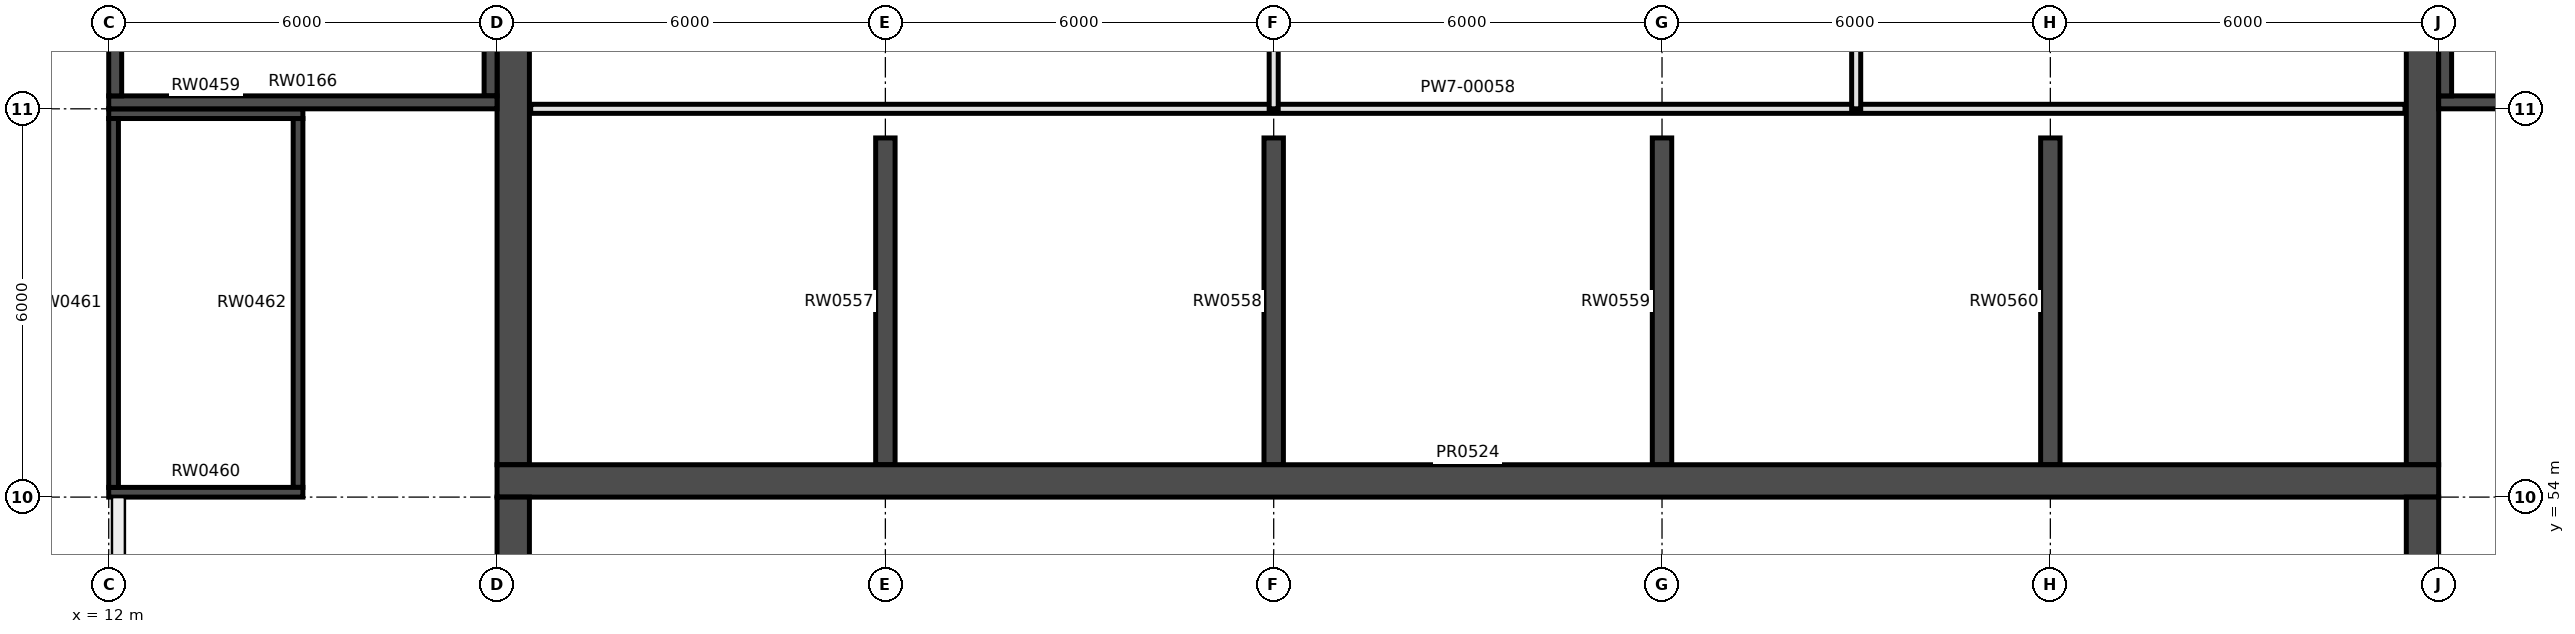
"""IFC4 building model, lengths in metres.
Left out: names, types, materials, properties, quantities, classifications, styles, units other than length and angle.
Written with IfcOpenShell. Run it as: python <this file> out.ifc"""

import sys

from ifc_helpers import new_model, si_unit, direction, frame, frame_2d, origin, place, context, subcontext, project, spatial, rectangle, extrude, element, fill, save


model = new_model("IFC4")
c1 = context("Model", 3, precision=1e-05, world=origin(), true_north=direction((0.0, 1.0)))
c2 = subcontext(c1, "Body", "Model", "MODEL_VIEW")
j1 = project(units=[si_unit("LENGTHUNIT", "METRE"), si_unit("PLANEANGLEUNIT", "RADIAN")], contexts=[c1])
p1 = place(None, origin())
s1 = spatial("IfcSite", under=j1, at=p1, CompositionType="ELEMENT")
p2 = place(p1, origin())
s2 = spatial("IfcBuilding", under=s1, at=p2, CompositionType="ELEMENT")
p3 = place(p2, origin())
s3 = spatial("IfcBuildingStorey", under=s2, at=p3, CompositionType="ELEMENT", Elevation=0.0)
p4 = place(p3, frame((12.0, 60.1, -0.3), z_axis=(0.0, 0.0, 1.0), x_axis=(1.0, 0.0, 0.0)))
e1 = element("IfcWall", 1, at=p4, inside=s3, PredefinedType="SHEAR", context=c2, shape_type="SweptSolid", body=[
    extrude(rectangle(XDim=6.0, YDim=0.2, at=frame_2d((3.0, 0.0))), origin(), (0.0, 0.0, 1.0), 7.3),
])
p5 = place(p4, frame((3.375, 0.0, 0.3)))
e2 = element("IfcOpeningElement", 2, at=p5, cuts=e1, PredefinedType="OPENING", context=c2, shape_type="SweptSolid", body=[
    extrude(rectangle(XDim=1.8, YDim=2.2, at=frame_2d((0.9, 1.1))), frame((0.0, 0.11, 0.0), z_axis=(0.0, -1.0, 0.0), x_axis=(1.0, 0.0, 0.0)), (0.0, 0.0, 1.0), 0.22),
])
p6 = place(p3, frame((12.1, 60.2, -0.3), z_axis=(0.0, 0.0, 1.0), x_axis=(0.0, 1.0, 0.0)))
e3 = element("IfcWall", 3, at=p6, inside=s3, PredefinedType="SHEAR", context=c2, shape_type="SweptSolid", body=[
    extrude(rectangle(XDim=5.6, YDim=0.2, at=frame_2d((2.8, 0.0))), origin(), (0.0, 0.0, 1.0), 7.3),
])
p7 = place(p6, frame((0.1, 0.0, 0.3)))
e4 = element("IfcOpeningElement", 4, at=p7, cuts=e3, PredefinedType="OPENING", context=c2, shape_type="SweptSolid", body=[
    extrude(rectangle(XDim=1.1, YDim=2.4, at=frame_2d((0.55, 1.2))), frame((0.0, 0.11, 0.0), z_axis=(0.0, -1.0, 0.0), x_axis=(1.0, 0.0, 0.0)), (0.0, 0.0, 1.0), 0.22),
])
p8 = place(p3, frame((17.9, 60.2, -0.3), z_axis=(0.0, 0.0, 1.0), x_axis=(0.0, 1.0, 0.0)))
e5 = element("IfcWall", 5, at=p8, inside=s3, PredefinedType="SHEAR", context=c2, shape_type="SweptSolid", body=[
    extrude(rectangle(XDim=5.6, YDim=0.2, at=frame_2d((2.8, 0.0))), origin(), (0.0, 0.0, 1.0), 7.3),
])
p9 = place(p3, frame((48.0, 60.1, -0.3), z_axis=(0.0, 0.0, 1.0), x_axis=(1.0, 0.0, 0.0)))
e6 = element("IfcWall", 6, at=p9, inside=s3, PredefinedType="SHEAR", context=c2, shape_type="SweptSolid", body=[
    extrude(rectangle(XDim=6.0, YDim=0.2, at=frame_2d((3.0, 0.0))), origin(), (0.0, 0.0, 1.0), 7.3),
])
p10 = place(p9, frame((0.825, 0.0, 0.3)))
e7 = element("IfcOpeningElement", 7, at=p10, cuts=e6, PredefinedType="OPENING", context=c2, shape_type="SweptSolid", body=[
    extrude(rectangle(XDim=1.8, YDim=2.2, at=frame_2d((0.9, 1.1))), frame((0.0, 0.11, 0.0), z_axis=(0.0, -1.0, 0.0), x_axis=(1.0, 0.0, 0.0)), (0.0, 0.0, 1.0), 0.22),
])
p11 = place(p3, frame((48.1, 60.2, -0.3), z_axis=(0.0, 0.0, 1.0), x_axis=(0.0, 1.0, 0.0)))
e8 = element("IfcWall", 8, at=p11, inside=s3, PredefinedType="SHEAR", context=c2, shape_type="SweptSolid", body=[
    extrude(rectangle(XDim=5.6, YDim=0.2, at=frame_2d((2.8, 0.0))), origin(), (0.0, 0.0, 1.0), 7.3),
])
for number, where, z_axis, x_axis in (
    (9, (12.0, 59.925, -0.3), (0.0, 0.0, 1.0), (1.0, 0.0, 0.0)),
    (10, (12.0, 54.075, -0.3), (0.0, 0.0, 1.0), (1.0, 0.0, 0.0)),
):
    element("IfcWall", number, at=place(p3, frame(where, z_axis=z_axis, x_axis=x_axis)), inside=s3, PredefinedType="SHEAR", context=c2, shape_type="SweptSolid", body=[
        extrude(rectangle(XDim=3.0, YDim=0.15, at=frame_2d((1.5, 0.0))), origin(), (0.0, 0.0, 1.0), 7.3),
    ])
p12 = place(p3, frame((12.075, 54.15, -0.3), z_axis=(0.0, 0.0, 1.0), x_axis=(0.0, 1.0, 0.0)))
e11 = element("IfcWall", 11, at=p12, inside=s3, PredefinedType="SHEAR", context=c2, shape_type="SweptSolid", body=[
    extrude(rectangle(XDim=5.7, YDim=0.15, at=frame_2d((2.85, 0.0))), origin(), (0.0, 0.0, 1.0), 7.3),
])
p13 = place(p3, frame((14.925, 54.15, -0.3), z_axis=(0.0, 0.0, 1.0), x_axis=(0.0, 1.0, 0.0)))
e12 = element("IfcWall", 12, at=p13, inside=s3, PredefinedType="SHEAR", context=c2, shape_type="SweptSolid", body=[
    extrude(rectangle(XDim=5.7, YDim=0.15, at=frame_2d((2.85, 0.0))), origin(), (0.0, 0.0, 1.0), 7.3),
])
p14 = place(p13, frame((2.5, 0.0, 0.3)))
e13 = element("IfcOpeningElement", 13, at=p14, cuts=e12, PredefinedType="OPENING", context=c2, shape_type="SweptSolid", body=[
    extrude(rectangle(XDim=0.6, YDim=2.04, at=frame_2d((0.3, 1.02))), frame((0.0, 0.085, 0.0), z_axis=(0.0, -1.0, 0.0), x_axis=(1.0, 0.0, 0.0)), (0.0, 0.0, 1.0), 0.17),
])
p15 = place(p3, frame((18.25, 54.5, -0.3), z_axis=(0.0, 0.0, 1.0), x_axis=(0.0, 1.0, 0.0)))
e14 = element("IfcWall", 14, at=p15, inside=s3, PredefinedType="SHEAR", context=c2, shape_type="SweptSolid", body=[
    extrude(rectangle(XDim=35.5, YDim=0.5, at=frame_2d((17.75, 0.0))), origin(), (0.0, 0.0, 1.0), 7.3),
])
p16 = place(p15, frame((1.55, 0.0, 0.3)))
e15 = element("IfcOpeningElement", 15, at=p16, cuts=e14, PredefinedType="OPENING", context=c2, shape_type="SweptSolid", body=[
    extrude(rectangle(XDim=1.8, YDim=2.1, at=frame_2d((0.9, 1.05))), frame((0.0, 0.26, 0.0), z_axis=(0.0, -1.0, 0.0), x_axis=(1.0, 0.0, 0.0)), (0.0, 0.0, 1.0), 0.52),
])
p17 = place(p15, frame((18.05, 0.0, 0.3)))
e16 = element("IfcOpeningElement", 16, at=p17, cuts=e14, PredefinedType="OPENING", context=c2, shape_type="SweptSolid", body=[
    extrude(rectangle(XDim=1.8, YDim=2.1, at=frame_2d((0.9, 1.05))), frame((0.0, 0.26, 0.0), z_axis=(0.0, -1.0, 0.0), x_axis=(1.0, 0.0, 0.0)), (0.0, 0.0, 1.0), 0.52),
])
p18 = place(p3, frame((18.25, 30.0, -0.3), z_axis=(0.0, 0.0, 1.0), x_axis=(0.0, 1.0, 0.0)))
e17 = element("IfcWall", 17, at=p18, inside=s3, PredefinedType="SHEAR", context=c2, shape_type="SweptSolid", body=[
    extrude(rectangle(XDim=24.0, YDim=0.5, at=frame_2d((12.0, 0.0))), origin(), (0.0, 0.0, 1.0), 7.3),
])
p19 = place(p18, frame((16.95, 0.0, 0.3)))
e18 = element("IfcOpeningElement", 18, at=p19, cuts=e17, PredefinedType="OPENING", context=c2, shape_type="SweptSolid", body=[
    extrude(rectangle(XDim=2.1, YDim=2.4, at=frame_2d((1.05, 1.2))), frame((0.0, 0.26, 0.0), z_axis=(0.0, -1.0, 0.0), x_axis=(1.0, 0.0, 0.0)), (0.0, 0.0, 1.0), 0.52),
])
p20 = place(p18, frame((2.25, 0.0, 0.3)))
e19 = element("IfcOpeningElement", 19, at=p20, cuts=e17, PredefinedType="OPENING", context=c2, shape_type="SweptSolid", body=[
    extrude(rectangle(XDim=1.5, YDim=2.1, at=frame_2d((0.75, 1.05))), frame((0.0, 0.26, 0.0), z_axis=(0.0, -1.0, 0.0), x_axis=(1.0, 0.0, 0.0)), (0.0, 0.0, 1.0), 0.52),
])
p21 = place(p3, frame((47.75, 54.5, -0.3), z_axis=(0.0, 0.0, 1.0), x_axis=(0.0, 1.0, 0.0)))
e20 = element("IfcWall", 20, at=p21, inside=s3, PredefinedType="SHEAR", context=c2, shape_type="SweptSolid", body=[
    extrude(rectangle(XDim=35.5, YDim=0.5, at=frame_2d((17.75, 0.0))), origin(), (0.0, 0.0, 1.0), 7.3),
])
p22 = place(p21, frame((18.05, 0.0, 0.3)))
e21 = element("IfcOpeningElement", 21, at=p22, cuts=e20, PredefinedType="OPENING", context=c2, shape_type="SweptSolid", body=[
    extrude(rectangle(XDim=1.8, YDim=2.1, at=frame_2d((0.9, 1.05))), frame((0.0, 0.26, 0.0), z_axis=(0.0, -1.0, 0.0), x_axis=(1.0, 0.0, 0.0)), (0.0, 0.0, 1.0), 0.52),
])
p23 = place(p21, frame((3.6, 0.0, 0.3)))
e22 = element("IfcOpeningElement", 22, at=p23, cuts=e20, PredefinedType="OPENING", context=c2, shape_type="SweptSolid", body=[
    extrude(rectangle(XDim=1.0, YDim=2.1, at=frame_2d((0.5, 1.05))), frame((0.0, 0.26, 0.0), z_axis=(0.0, -1.0, 0.0), x_axis=(1.0, 0.0, 0.0)), (0.0, 0.0, 1.0), 0.52),
])
p24 = place(p3, frame((47.75, 30.0, -0.3), z_axis=(0.0, 0.0, 1.0), x_axis=(0.0, 1.0, 0.0)))
e23 = element("IfcWall", 23, at=p24, inside=s3, PredefinedType="SHEAR", context=c2, shape_type="SweptSolid", body=[
    extrude(rectangle(XDim=24.0, YDim=0.5, at=frame_2d((12.0, 0.0))), origin(), (0.0, 0.0, 1.0), 7.3),
])
p25 = place(p24, frame((2.25, 0.0, 0.3)))
e24 = element("IfcOpeningElement", 24, at=p25, cuts=e23, PredefinedType="OPENING", context=c2, shape_type="SweptSolid", body=[
    extrude(rectangle(XDim=1.5, YDim=2.1, at=frame_2d((0.75, 1.05))), frame((0.0, 0.26, 0.0), z_axis=(0.0, -1.0, 0.0), x_axis=(1.0, 0.0, 0.0)), (0.0, 0.0, 1.0), 0.52),
])
p26 = place(p24, frame((22.3, 0.0, 0.3)))
e25 = element("IfcOpeningElement", 25, at=p26, cuts=e23, PredefinedType="OPENING", context=c2, shape_type="SweptSolid", body=[
    extrude(rectangle(XDim=1.0, YDim=2.1, at=frame_2d((0.5, 1.05))), frame((0.0, 0.26, 0.0), z_axis=(0.0, -1.0, 0.0), x_axis=(1.0, 0.0, 0.0)), (0.0, 0.0, 1.0), 0.52),
])
p27 = place(p3, frame((18.0, 54.25, -0.3), z_axis=(0.0, 0.0, 1.0), x_axis=(1.0, 0.0, 0.0)))
e26 = element("IfcWall", 26, at=p27, inside=s3, PredefinedType="SHEAR", context=c2, shape_type="SweptSolid", body=[
    extrude(rectangle(XDim=30.0, YDim=0.5, at=frame_2d((15.0, 0.0))), origin(), (0.0, 0.0, 1.0), 7.3),
])
for number, where, z_axis, x_axis in (
    (27, (24.0, 54.5, -0.3), (0.0, 0.0, 1.0), (0.0, 1.0, 0.0)),
    (28, (30.0, 54.5, -0.3), (0.0, 0.0, 1.0), (0.0, 1.0, 0.0)),
    (29, (36.0, 54.5, -0.3), (0.0, 0.0, 1.0), (0.0, 1.0, 0.0)),
    (30, (42.0, 54.5, -0.3), (0.0, 0.0, 1.0), (0.0, 1.0, 0.0)),
):
    element("IfcWall", number, at=place(p3, frame(where, z_axis=z_axis, x_axis=x_axis)), inside=s3, PredefinedType="SHEAR", context=c2, shape_type="SweptSolid", body=[
        extrude(rectangle(XDim=5.05, YDim=0.3, at=frame_2d((2.525, 0.0))), origin(), (0.0, 0.0, 1.0), 4.0),
    ])
p28 = place(p3, frame((18.52, 60.0, 0.0), z_axis=(0.0, 0.0, 1.0), x_axis=(1.0, 0.0, 0.0)))
e31 = element("IfcWall", 31, at=p28, inside=s3, PredefinedType="PARTITIONING", context=c2, shape_type="SweptSolid", body=[
    extrude(rectangle(XDim=28.96, YDim=0.14, at=frame_2d((14.48, 0.0))), origin(), (0.0, 0.0, 1.0), 2.964),
])
for number, where, z_axis, x_axis in (
    (32, (30.0, 60.0, 0.0), (0.0, 0.0, 1.0), (0.0, 1.0, 0.0)),
    (33, (39.0, 60.0, 0.0), (0.0, 0.0, 1.0), (0.0, 1.0, 0.0)),
):
    element("IfcWall", number, at=place(p3, frame(where, z_axis=z_axis, x_axis=x_axis)), inside=s3, PredefinedType="PARTITIONING", context=c2, shape_type="SweptSolid", body=[
        extrude(rectangle(XDim=12.0, YDim=0.14, at=frame_2d((6.0, 0.0))), origin(), (0.0, 0.0, 1.0), 2.964),
    ])
p29 = place(p7, origin())
e34 = element("IfcDoor", 34, at=p29, inside=s3, OperationType="DOUBLE_DOOR_SINGLE_SWING", PredefinedType="DOOR", context=c2, shape_type="SweptSolid", body=[
    extrude(rectangle(XDim=1.1, YDim=2.4, at=frame_2d((0.55, 1.2))), frame((0.0, 0.025, 0.0), z_axis=(0.0, -1.0, 0.0), x_axis=(1.0, 0.0, 0.0)), (0.0, 0.0, 1.0), 0.05),
])
fill(e4, e34)
p30 = place(p16, frame((1.8, 0.0, 0.0), z_axis=(0.0, 0.0, 1.0), x_axis=(-1.0, 0.0, 0.0)))
e35 = element("IfcDoor", 35, at=p30, inside=s3, OperationType="DOUBLE_DOOR_SINGLE_SWING", PredefinedType="DOOR", context=c2, shape_type="SweptSolid", body=[
    extrude(rectangle(XDim=1.8, YDim=2.1, at=frame_2d((0.9, 1.05))), frame((0.0, 0.025, 0.0), z_axis=(0.0, -1.0, 0.0), x_axis=(1.0, 0.0, 0.0)), (0.0, 0.0, 1.0), 0.05),
])
fill(e15, e35)
p31 = place(p5, origin())
e36 = element("IfcDoor", 36, at=p31, inside=s3, OperationType="DOUBLE_DOOR_SINGLE_SWING", PredefinedType="DOOR", context=c2, shape_type="SweptSolid", body=[
    extrude(rectangle(XDim=1.8, YDim=2.2, at=frame_2d((0.9, 1.1))), frame((0.0, 0.025, 0.0), z_axis=(0.0, -1.0, 0.0), x_axis=(1.0, 0.0, 0.0)), (0.0, 0.0, 1.0), 0.05),
])
fill(e2, e36)
p32 = place(p10, origin())
e37 = element("IfcDoor", 37, at=p32, inside=s3, OperationType="DOUBLE_DOOR_SINGLE_SWING", PredefinedType="DOOR", context=c2, shape_type="SweptSolid", body=[
    extrude(rectangle(XDim=1.8, YDim=2.2, at=frame_2d((0.9, 1.1))), frame((0.0, 0.025, 0.0), z_axis=(0.0, -1.0, 0.0), x_axis=(1.0, 0.0, 0.0)), (0.0, 0.0, 1.0), 0.05),
])
fill(e7, e37)
p33 = place(p14, origin())
e38 = element("IfcDoor", 38, at=p33, inside=s3, OperationType="SINGLE_SWING_RIGHT", PredefinedType="DOOR", context=c2, shape_type="SweptSolid", body=[
    extrude(rectangle(XDim=0.6, YDim=2.04, at=frame_2d((0.3, 1.02))), frame((0.0, 0.025, 0.0), z_axis=(0.0, -1.0, 0.0), x_axis=(1.0, 0.0, 0.0)), (0.0, 0.0, 1.0), 0.05),
])
fill(e13, e38)
p34 = place(p23, frame((1.0, 0.0, 0.0), z_axis=(0.0, 0.0, 1.0), x_axis=(-1.0, 0.0, 0.0)))
e39 = element("IfcDoor", 39, at=p34, inside=s3, OperationType="SINGLE_SWING_LEFT", PredefinedType="DOOR", context=c2, shape_type="SweptSolid", body=[
    extrude(rectangle(XDim=1.0, YDim=2.1, at=frame_2d((0.5, 1.05))), frame((0.0, 0.025, 0.0), z_axis=(0.0, -1.0, 0.0), x_axis=(1.0, 0.0, 0.0)), (0.0, 0.0, 1.0), 0.05),
])
fill(e22, e39)
p35 = place(p26, frame((1.0, 0.0, 0.0), z_axis=(0.0, 0.0, 1.0), x_axis=(-1.0, 0.0, 0.0)))
e40 = element("IfcDoor", 40, at=p35, inside=s3, OperationType="SINGLE_SWING_LEFT", PredefinedType="DOOR", context=c2, shape_type="SweptSolid", body=[
    extrude(rectangle(XDim=1.0, YDim=2.1, at=frame_2d((0.5, 1.05))), frame((0.0, 0.025, 0.0), z_axis=(0.0, -1.0, 0.0), x_axis=(1.0, 0.0, 0.0)), (0.0, 0.0, 1.0), 0.05),
])
fill(e25, e40)
save(model, sys.argv[1])
